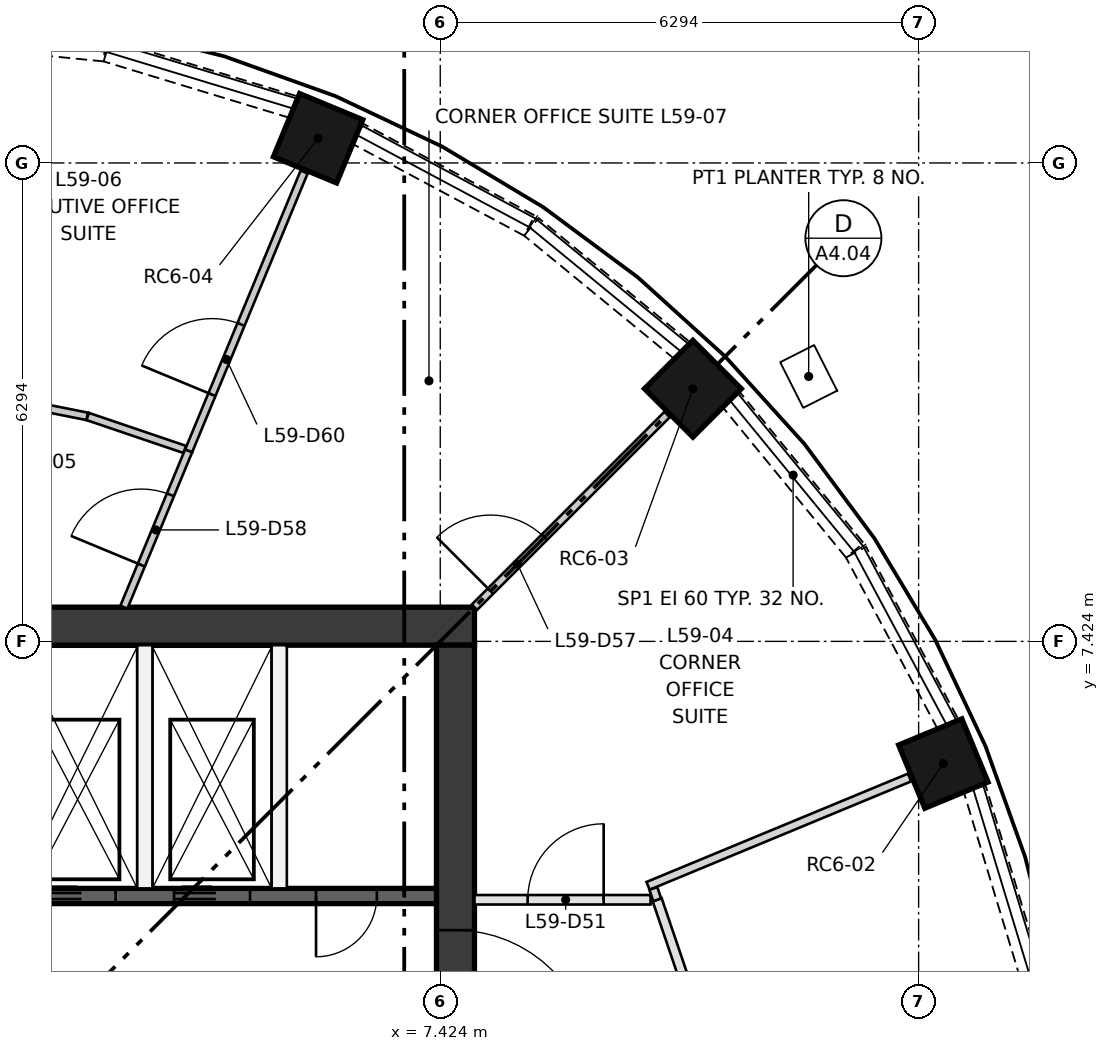
"""IFC4 building model, lengths in metres.
Left out: names, types, materials, properties, quantities, classifications, styles, units other than length and angle.
Written with IfcOpenShell. Run it as: python <this file> out.ifc"""

import sys

from ifc_helpers import new_model, si_unit, direction, frame, frame_2d, origin, origin_2d, place, context, subcontext, project, spatial, rectangle, extrude, element, fill, save


model = new_model("IFC4")
c1 = context("Model", 3, precision=1e-05, world=origin(), true_north=direction((0.0, 1.0)))
c2 = subcontext(c1, "Body", "Model", "MODEL_VIEW")
j1 = project(units=[si_unit("LENGTHUNIT", "METRE"), si_unit("PLANEANGLEUNIT", "RADIAN")], contexts=[c1])
p1 = place(None, origin())
s1 = spatial("IfcSite", under=j1, at=p1, CompositionType="ELEMENT")
p2 = place(p1, origin())
s2 = spatial("IfcBuilding", under=s1, at=p2, CompositionType="ELEMENT")
p3 = place(p2, frame((0.0, 0.0, 217.8)))
s3 = spatial("IfcBuildingStorey", under=s2, at=p3, CompositionType="ELEMENT", Elevation=217.8)
for number, where, z_axis, x_axis in (
    (1, (14.043, 5.817, 0.5), (0.0, 0.0, 1.0), (0.924, 0.383, 0.0)),
    (2, (10.748, 10.748, 0.5), (0.0, 0.0, 1.0), (0.707, 0.707, 0.0)),
    (3, (5.817, 14.043, 0.5), (0.0, 0.0, 1.0), (0.383, 0.924, 0.0)),
):
    element("IfcColumn", number, at=place(p3, frame(where, z_axis=z_axis, x_axis=x_axis)), inside=s3, PredefinedType="COLUMN", context=c2, shape_type="SweptSolid", body=[
        extrude(rectangle(XDim=0.9, YDim=0.9, at=origin_2d()), origin(), (0.0, 0.0, 1.0), 2.85),
    ])
p4 = place(p3, frame((-7.874, 7.624, 0.0), z_axis=(0.0, 0.0, 1.0), x_axis=(1.0, 0.0, 0.0)))
e4 = element("IfcWall", 4, at=p4, inside=s3, PredefinedType="SHEAR", context=c2, shape_type="SweptSolid", body=[
    extrude(rectangle(XDim=15.748, YDim=0.5, at=frame_2d((7.874, 0.0))), origin(), (0.0, 0.0, 1.0), 3.35),
])
p5 = place(p3, frame((7.624, -7.374, 0.0), z_axis=(0.0, 0.0, 1.0), x_axis=(0.0, 1.0, 0.0)))
e5 = element("IfcWall", 5, at=p5, inside=s3, PredefinedType="SHEAR", context=c2, shape_type="SweptSolid", body=[
    extrude(rectangle(XDim=14.748, YDim=0.5, at=frame_2d((7.374, 0.0))), origin(), (0.0, 0.0, 1.0), 3.35),
])
p6 = place(p5, frame((6.874, 0.0, 0.0)))
e6 = element("IfcOpeningElement", 6, at=p6, cuts=e5, PredefinedType="OPENING", context=c2, shape_type="SweptSolid", body=[
    extrude(rectangle(XDim=1.0, YDim=2.1, at=frame_2d((0.5, 1.05))), frame((0.0, 0.26, 0.0), z_axis=(0.0, -1.0, 0.0), x_axis=(1.0, 0.0, 0.0)), (0.0, 0.0, 1.0), 0.52),
])
p7 = place(p5, frame((3.75, 0.0, 0.0)))
e7 = element("IfcOpeningElement", 7, at=p7, cuts=e5, PredefinedType="OPENING", context=c2, shape_type="SweptSolid", body=[
    extrude(rectangle(XDim=1.8, YDim=2.1, at=frame_2d((0.9, 1.05))), frame((0.0, 0.26, 0.0), z_axis=(0.0, -1.0, 0.0), x_axis=(1.0, 0.0, 0.0)), (0.0, 0.0, 1.0), 0.52),
])
p8 = place(p5, frame((9.198, 0.0, 0.0)))
e8 = element("IfcOpeningElement", 8, at=p8, cuts=e5, PredefinedType="OPENING", context=c2, shape_type="SweptSolid", body=[
    extrude(rectangle(XDim=1.8, YDim=2.1, at=frame_2d((0.9, 1.05))), frame((0.0, 0.26, 0.0), z_axis=(0.0, -1.0, 0.0), x_axis=(1.0, 0.0, 0.0)), (0.0, 0.0, 1.0), 0.52),
])
p9 = place(p3, frame((0.0, 4.074, 0.0), z_axis=(0.0, 0.0, 1.0), x_axis=(1.0, 0.0, 0.0)))
e9 = element("IfcWall", 9, at=p9, inside=s3, PredefinedType="SHEAR", context=c2, shape_type="SweptSolid", body=[
    extrude(rectangle(XDim=7.374, YDim=0.2, at=frame_2d((3.687, 0.0))), origin(), (0.0, 0.0, 1.0), 3.0),
])
p10 = place(p9, frame((0.384, 0.0, 0.0)))
e10 = element("IfcOpeningElement", 10, at=p10, cuts=e9, PredefinedType="OPENING", context=c2, shape_type="SweptSolid", body=[
    extrude(rectangle(XDim=1.0, YDim=2.1, at=frame_2d((0.5, 1.05))), frame((0.0, 0.11, 0.0), z_axis=(0.0, -1.0, 0.0), x_axis=(1.0, 0.0, 0.0)), (0.0, 0.0, 1.0), 0.22),
])
p11 = place(p9, frame((2.153, 0.0, 0.0)))
e11 = element("IfcOpeningElement", 11, at=p11, cuts=e9, PredefinedType="OPENING", context=c2, shape_type="SweptSolid", body=[
    extrude(rectangle(XDim=1.0, YDim=2.1, at=frame_2d((0.5, 1.05))), frame((0.0, 0.11, 0.0), z_axis=(0.0, -1.0, 0.0), x_axis=(1.0, 0.0, 0.0)), (0.0, 0.0, 1.0), 0.22),
])
p12 = place(p9, frame((3.921, 0.0, 0.0)))
e12 = element("IfcOpeningElement", 12, at=p12, cuts=e9, PredefinedType="OPENING", context=c2, shape_type="SweptSolid", body=[
    extrude(rectangle(XDim=1.0, YDim=2.1, at=frame_2d((0.5, 1.05))), frame((0.0, 0.11, 0.0), z_axis=(0.0, -1.0, 0.0), x_axis=(1.0, 0.0, 0.0)), (0.0, 0.0, 1.0), 0.22),
])
p13 = place(p9, frame((5.79, 0.0, 0.0)))
e13 = element("IfcOpeningElement", 13, at=p13, cuts=e9, PredefinedType="OPENING", context=c2, shape_type="SweptSolid", body=[
    extrude(rectangle(XDim=0.8, YDim=2.1, at=frame_2d((0.4, 1.05))), frame((0.0, 0.11, 0.0), z_axis=(0.0, -1.0, 0.0), x_axis=(1.0, 0.0, 0.0)), (0.0, 0.0, 1.0), 0.22),
])
for number, where, z_axis, x_axis in (
    (14, (3.537, 4.174, 0.0), (0.0, 0.0, 1.0), (0.0, 1.0, 0.0)),
    (15, (5.305, 4.174, 0.0), (0.0, 0.0, 1.0), (0.0, 1.0, 0.0)),
):
    element("IfcWall", number, at=place(p3, frame(where, z_axis=z_axis, x_axis=x_axis)), inside=s3, PredefinedType="PARTITIONING", context=c2, shape_type="SweptSolid", body=[
        extrude(rectangle(XDim=3.2, YDim=0.2, at=frame_2d((1.6, 0.0))), origin(), (0.0, 0.0, 1.0), 3.0),
    ])
p14 = place(p3, frame((15.198, 3.038, 0.0), z_axis=(0.0, 0.0, 1.0), x_axis=(-0.290219358397, 0.956960147557, 0.0)))
e16 = element("IfcWall", 16, at=p14, inside=s3, PredefinedType="SOLIDWALL", context=c2, shape_type="SweptSolid", body=[
    extrude(rectangle(XDim=2.557, YDim=0.3, at=frame_2d((1.279, 0.0))), origin(), (0.0, 0.0, 1.0), 0.9),
])
p15 = place(p3, frame((14.1, 6.343, 0.0), z_axis=(0.0, 0.0, 1.0), x_axis=(-0.471603904468, 0.881810499649, 0.0)))
e17 = element("IfcWall", 17, at=p15, inside=s3, PredefinedType="SOLIDWALL", context=c2, shape_type="SweptSolid", body=[
    extrude(rectangle(XDim=2.557, YDim=0.3, at=frame_2d((1.278, 0.0))), origin(), (0.0, 0.0, 1.0), 0.9),
])
for number, where, z_axis, x_axis in (
    (18, (12.877, 8.623, 0.0), (0.0, 0.0, 1.0), (-0.634, 0.773, 0.0)),
    (19, (10.6, 11.256, 0.0), (0.0, 0.0, 1.0), (-0.773, 0.634, 0.0)),
):
    element("IfcWall", number, at=place(p3, frame(where, z_axis=z_axis, x_axis=x_axis)), inside=s3, PredefinedType="SOLIDWALL", context=c2, shape_type="SweptSolid", body=[
        extrude(rectangle(XDim=2.558, YDim=0.3, at=frame_2d((1.279, 0.0))), origin(), (0.0, 0.0, 1.0), 0.9),
    ])
p16 = place(p3, frame((8.598, 12.894, 0.0), z_axis=(0.0, 0.0, 1.0), x_axis=(-0.881810499649, 0.471603904468, 0.0)))
e20 = element("IfcWall", 20, at=p16, inside=s3, PredefinedType="SOLIDWALL", context=c2, shape_type="SweptSolid", body=[
    extrude(rectangle(XDim=2.557, YDim=0.3, at=frame_2d((1.278, 0.0))), origin(), (0.0, 0.0, 1.0), 0.9),
])
p17 = place(p3, frame((5.486, 14.455, 0.0), z_axis=(0.0, 0.0, 1.0), x_axis=(-0.956960147557, 0.290219358397, 0.0)))
e21 = element("IfcWall", 21, at=p17, inside=s3, PredefinedType="SOLIDWALL", context=c2, shape_type="SweptSolid", body=[
    extrude(rectangle(XDim=2.557, YDim=0.3, at=frame_2d((1.279, 0.0))), origin(), (0.0, 0.0, 1.0), 0.9),
])
p18 = place(p3, frame((3.009, 15.204, 0.0), z_axis=(0.0, 0.0, 1.0), x_axis=(-0.995173293352, 0.09813315545, 0.0)))
e22 = element("IfcWall", 22, at=p18, inside=s3, PredefinedType="SOLIDWALL", context=c2, shape_type="SweptSolid", body=[
    extrude(rectangle(XDim=2.558, YDim=0.3, at=frame_2d((1.279, 0.0))), origin(), (0.0, 0.0, 1.0), 0.9),
])
p19 = place(p3, frame((10.278, 4.024, 0.0), z_axis=(0.0, 0.0, 1.0), x_axis=(0.321363343769, -0.946955965862, 0.0)))
e23 = element("IfcWall", 23, at=p19, inside=s3, PredefinedType="PARTITIONING", context=c2, shape_type="SweptSolid", body=[
    extrude(rectangle(XDim=1.225, YDim=0.125, at=frame_2d((0.613, 0.0))), origin(), (0.0, 0.0, 1.0), 3.0),
])
p20 = place(p3, frame((7.874, 4.024, 0.0), z_axis=(0.0, 0.0, 1.0), x_axis=(1.0, 0.0, 0.0)))
e24 = element("IfcWall", 24, at=p20, inside=s3, PredefinedType="PARTITIONING", context=c2, shape_type="SweptSolid", body=[
    extrude(rectangle(XDim=2.317, YDim=0.125, at=frame_2d((1.158, 0.0))), origin(), (0.0, 0.0, 1.0), 3.0),
])
p21 = place(p20, frame((0.7, 0.0, 0.0)))
e25 = element("IfcOpeningElement", 25, at=p21, cuts=e24, PredefinedType="OPENING", context=c2, shape_type="SweptSolid", body=[
    extrude(rectangle(XDim=1.0, YDim=2.1, at=frame_2d((0.5, 1.05))), frame((0.0, 0.073, 0.0), z_axis=(0.0, -1.0, 0.0), x_axis=(1.0, 0.0, 0.0)), (0.0, 0.0, 1.0), 0.145),
])
p22 = place(p3, frame((10.158, 4.208, 0.0), z_axis=(0.0, 0.0, 1.0), x_axis=(0.923897012701, 0.382641228728, 0.0)))
e26 = element("IfcWall", 26, at=p22, inside=s3, PredefinedType="PARTITIONING", context=c2, shape_type="SweptSolid", body=[
    extrude(rectangle(XDim=3.725, YDim=0.11, at=frame_2d((1.862, 0.0))), origin(), (0.0, 0.0, 1.0), 3.0),
])
p23 = place(p3, frame((10.278, 4.024, 0.0), z_axis=(0.0, 0.0, 1.0), x_axis=(-0.321819116975, 0.94680117023, 0.0)))
e27 = element("IfcWall", 27, at=p23, inside=s3, PredefinedType="PARTITIONING", context=c2, shape_type="SweptSolid", body=[
    extrude(rectangle(XDim=0.157, YDim=0.11, at=frame_2d((0.079, 0.0))), origin(), (0.0, 0.0, 1.0), 3.0),
])
p24 = place(p3, frame((7.874, 7.874, 0.0), z_axis=(0.0, 0.0, 1.0), x_axis=(0.707106781187, 0.707106781187, 0.0)))
e28 = element("IfcWall", 28, at=p24, inside=s3, PredefinedType="PARTITIONING", context=c2, shape_type="SweptSolid", body=[
    extrude(rectangle(XDim=3.584, YDim=0.1, at=frame_2d((1.792, 0.0))), origin(), (0.0, 0.0, 1.0), 3.0),
])
p25 = place(p24, frame((0.3, 0.0, 0.0)))
e29 = element("IfcOpeningElement", 29, at=p25, cuts=e28, PredefinedType="OPENING", context=c2, shape_type="SweptSolid", body=[
    extrude(rectangle(XDim=1.0, YDim=2.1, at=frame_2d((0.5, 1.05))), frame((0.0, 0.06, 0.0), z_axis=(0.0, -1.0, 0.0), x_axis=(1.0, 0.0, 0.0)), (0.0, 0.0, 1.0), 0.12),
])
p26 = place(p3, frame((1.406, 10.657, 0.0), z_axis=(0.0, 0.0, 1.0), x_axis=(0.980761417594, -0.19521025014, 0.0)))
e30 = element("IfcWall", 30, at=p26, inside=s3, PredefinedType="PARTITIONING", context=c2, shape_type="SweptSolid", body=[
    extrude(rectangle(XDim=1.399, YDim=0.1, at=frame_2d((0.7, 0.0))), origin(), (0.0, 0.0, 1.0), 3.0),
])
p27 = place(p3, frame((2.785, 10.383, 0.0), z_axis=(0.0, 0.0, 1.0), x_axis=(0.946968869726, -0.32132531766, 0.0)))
e31 = element("IfcWall", 31, at=p27, inside=s3, PredefinedType="PARTITIONING", context=c2, shape_type="SweptSolid", body=[
    extrude(rectangle(XDim=1.349, YDim=0.1, at=frame_2d((0.675, 0.0))), origin(), (0.0, 0.0, 1.0), 3.0),
])
p28 = place(p3, frame((3.261, 7.874, 0.0), z_axis=(0.0, 0.0, 1.0), x_axis=(0.382684189911, 0.923879218725, 0.0)))
e32 = element("IfcWall", 32, at=p28, inside=s3, PredefinedType="PARTITIONING", context=c2, shape_type="SweptSolid", body=[
    extrude(rectangle(XDim=2.227, YDim=0.1, at=frame_2d((1.114, 0.0))), origin(), (0.0, 0.0, 1.0), 3.0),
])
p29 = place(p28, frame((0.6, 0.0, 0.0)))
e33 = element("IfcOpeningElement", 33, at=p29, cuts=e32, PredefinedType="OPENING", context=c2, shape_type="SweptSolid", body=[
    extrude(rectangle(XDim=1.0, YDim=2.1, at=frame_2d((0.5, 1.05))), frame((0.0, 0.06, 0.0), z_axis=(0.0, -1.0, 0.0), x_axis=(1.0, 0.0, 0.0)), (0.0, 0.0, 1.0), 0.12),
])
p30 = place(p3, frame((4.114, 9.932, 0.0), z_axis=(0.0, 0.0, 1.0), x_axis=(0.382675844596, 0.923882675432, 0.0)))
e34 = element("IfcWall", 34, at=p30, inside=s3, PredefinedType="PARTITIONING", context=c2, shape_type="SweptSolid", body=[
    extrude(rectangle(XDim=3.97, YDim=0.1, at=frame_2d((1.985, 0.0))), origin(), (0.0, 0.0, 1.0), 3.0),
])
p31 = place(p30, frame((0.8, 0.0, 0.0)))
e35 = element("IfcOpeningElement", 35, at=p31, cuts=e34, PredefinedType="OPENING", context=c2, shape_type="SweptSolid", body=[
    extrude(rectangle(XDim=1.0, YDim=2.1, at=frame_2d((0.5, 1.05))), frame((0.0, 0.06, 0.0), z_axis=(0.0, -1.0, 0.0), x_axis=(1.0, 0.0, 0.0)), (0.0, 0.0, 1.0), 0.12),
])
p32 = place(p11, frame((1.0, 0.0, 0.0), z_axis=(0.0, 0.0, 1.0), x_axis=(-1.0, 0.0, 0.0)))
e36 = element("IfcDoor", 36, at=p32, inside=s3, OperationType="DOUBLE_DOOR_SLIDING", PredefinedType="DOOR", context=c2, shape_type="SweptSolid", body=[
    extrude(rectangle(XDim=1.0, YDim=2.1, at=frame_2d((0.5, 1.05))), frame((0.0, 0.025, 0.0), z_axis=(0.0, -1.0, 0.0), x_axis=(1.0, 0.0, 0.0)), (0.0, 0.0, 1.0), 0.05),
])
fill(e11, e36)
p33 = place(p12, frame((1.0, 0.0, 0.0), z_axis=(0.0, 0.0, 1.0), x_axis=(-1.0, 0.0, 0.0)))
e37 = element("IfcDoor", 37, at=p33, inside=s3, OperationType="DOUBLE_DOOR_SLIDING", PredefinedType="DOOR", context=c2, shape_type="SweptSolid", body=[
    extrude(rectangle(XDim=1.0, YDim=2.1, at=frame_2d((0.5, 1.05))), frame((0.0, 0.025, 0.0), z_axis=(0.0, -1.0, 0.0), x_axis=(1.0, 0.0, 0.0)), (0.0, 0.0, 1.0), 0.05),
])
fill(e12, e37)
p34 = place(p13, frame((0.8, 0.0, 0.0), z_axis=(0.0, 0.0, 1.0), x_axis=(-1.0, 0.0, 0.0)))
e38 = element("IfcDoor", 38, at=p34, inside=s3, OperationType="SINGLE_SWING_LEFT", PredefinedType="DOOR", context=c2, shape_type="SweptSolid", body=[
    extrude(rectangle(XDim=0.8, YDim=2.1, at=frame_2d((0.4, 1.05))), frame((0.0, 0.025, 0.0), z_axis=(0.0, -1.0, 0.0), x_axis=(1.0, 0.0, 0.0)), (0.0, 0.0, 1.0), 0.05),
])
fill(e13, e38)
p35 = place(p8, frame((1.8, 0.0, 0.0), z_axis=(0.0, 0.0, 1.0), x_axis=(-1.0, 0.0, 0.0)))
e39 = element("IfcDoor", 39, at=p35, inside=s3, OperationType="DOUBLE_DOOR_SINGLE_SWING", PredefinedType="DOOR", context=c2, shape_type="SweptSolid", body=[
    extrude(rectangle(XDim=1.8, YDim=2.1, at=frame_2d((0.9, 1.05))), frame((0.0, 0.025, 0.0), z_axis=(0.0, -1.0, 0.0), x_axis=(1.0, 0.0, 0.0)), (0.0, 0.0, 1.0), 0.05),
])
fill(e8, e39)
p36 = place(p21, origin())
e40 = element("IfcDoor", 40, at=p36, inside=s3, OperationType="SINGLE_SWING_RIGHT", PredefinedType="DOOR", context=c2, shape_type="SweptSolid", body=[
    extrude(rectangle(XDim=1.0, YDim=2.1, at=frame_2d((0.5, 1.05))), frame((0.0, 0.025, 0.0), z_axis=(0.0, -1.0, 0.0), x_axis=(1.0, 0.0, 0.0)), (0.0, 0.0, 1.0), 0.05),
])
fill(e25, e40)
p37 = place(p25, origin())
e41 = element("IfcDoor", 41, at=p37, inside=s3, OperationType="SINGLE_SWING_LEFT", PredefinedType="DOOR", context=c2, shape_type="SweptSolid", body=[
    extrude(rectangle(XDim=1.0, YDim=2.1, at=frame_2d((0.5, 1.05))), frame((0.0, 0.025, 0.0), z_axis=(0.0, -1.0, 0.0), x_axis=(1.0, 0.0, 0.0)), (0.0, 0.0, 1.0), 0.05),
])
fill(e29, e41)
p38 = place(p29, origin())
e42 = element("IfcDoor", 42, at=p38, inside=s3, OperationType="SINGLE_SWING_LEFT", PredefinedType="DOOR", context=c2, shape_type="SweptSolid", body=[
    extrude(rectangle(XDim=1.0, YDim=2.1, at=frame_2d((0.5, 1.05))), frame((0.0, 0.025, 0.0), z_axis=(0.0, -1.0, 0.0), x_axis=(1.0, 0.0, 0.0)), (0.0, 0.0, 1.0), 0.05),
])
fill(e33, e42)
p39 = place(p31, origin())
e43 = element("IfcDoor", 43, at=p39, inside=s3, OperationType="SINGLE_SWING_LEFT", PredefinedType="DOOR", context=c2, shape_type="SweptSolid", body=[
    extrude(rectangle(XDim=1.0, YDim=2.1, at=frame_2d((0.5, 1.05))), frame((0.0, 0.025, 0.0), z_axis=(0.0, -1.0, 0.0), x_axis=(1.0, 0.0, 0.0)), (0.0, 0.0, 1.0), 0.05),
])
fill(e35, e43)
save(model, sys.argv[1])
